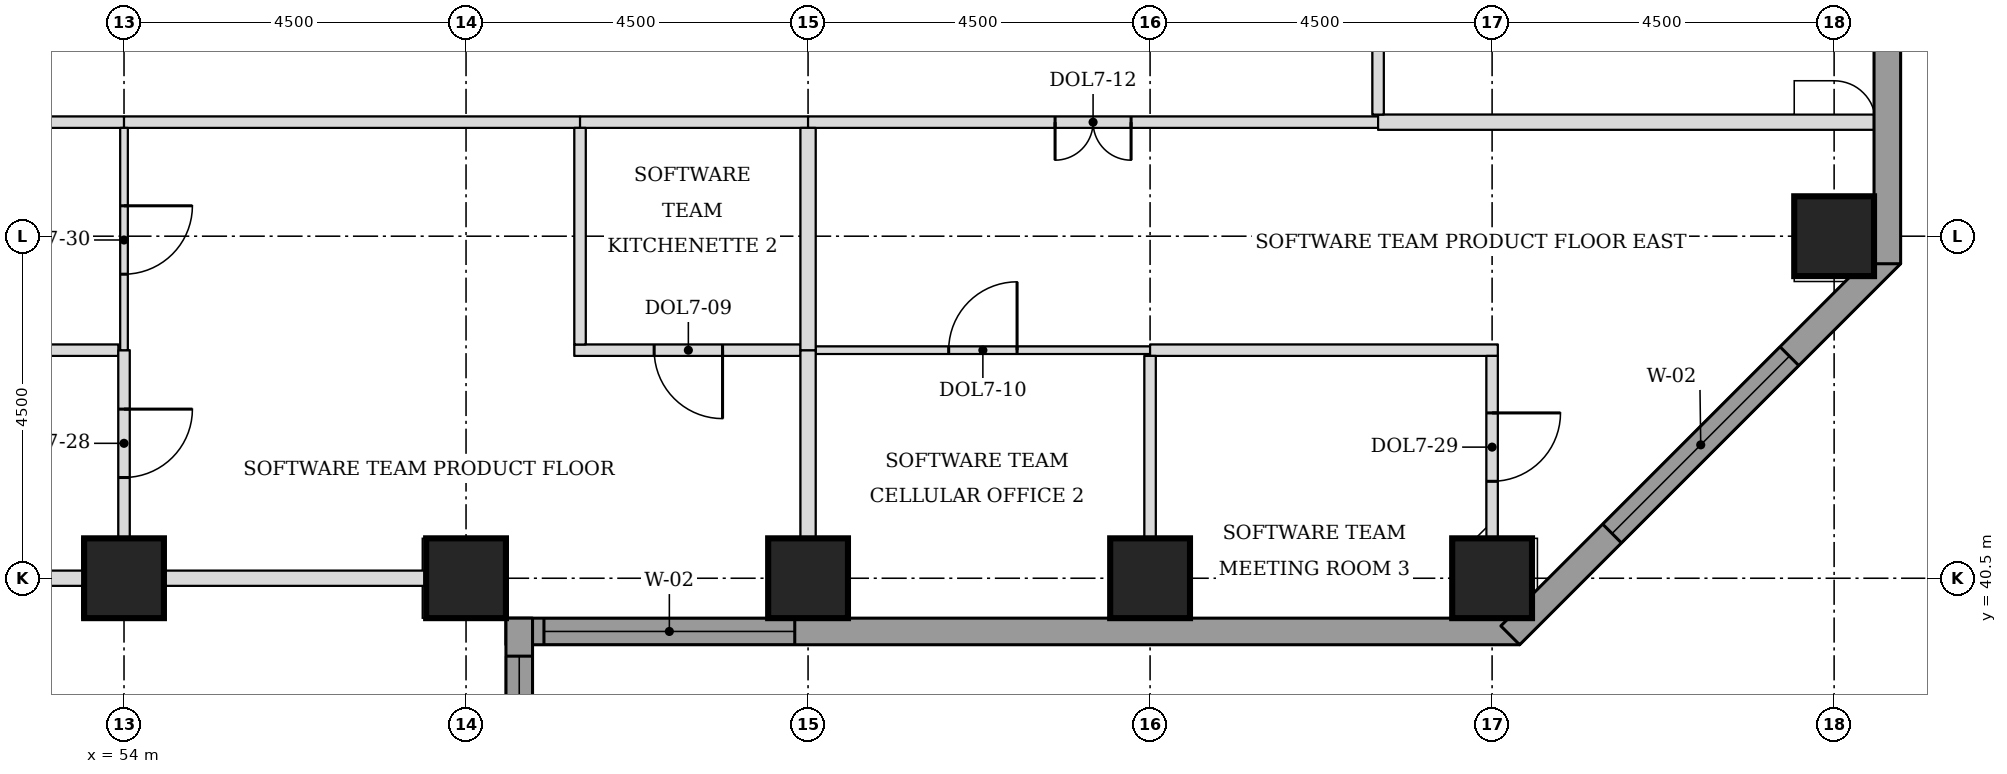
"""IFC4 building model, lengths in metres.
Left out: names, types, materials, properties, quantities, classifications, styles, units other than length and angle.
Written with IfcOpenShell. Run it as: python <this file> out.ifc"""

import sys

from ifc_helpers import new_model, si_unit, direction, frame, frame_2d, origin, origin_2d, place, context, subcontext, project, spatial, rectangle, extrude, element, fill, save


model = new_model("IFC4")
c1 = context("Model", 3, precision=1e-05, world=origin(), true_north=direction((0.0, 1.0)))
c2 = subcontext(c1, "Body", "Model", "MODEL_VIEW")
j1 = project(units=[si_unit("LENGTHUNIT", "METRE"), si_unit("PLANEANGLEUNIT", "RADIAN")], contexts=[c1])
p1 = place(None, origin())
s1 = spatial("IfcSite", under=j1, at=p1, CompositionType="ELEMENT")
p2 = place(p1, origin())
s2 = spatial("IfcBuilding", under=s1, at=p2, CompositionType="ELEMENT")
p3 = place(p2, frame((0.0, 0.0, 130.7)))
s3 = spatial("IfcBuildingStorey", under=s2, at=p3, CompositionType="ELEMENT", Elevation=130.7)
for number, where, z_axis, x_axis in (
    (1, (54.0, 40.5, 0.0), (0.0, 0.0, 1.0), (1.0, 0.0, 0.0)),
    (2, (58.5, 40.5, 0.0), (0.0, 0.0, 1.0), (1.0, 0.0, 0.0)),
    (3, (63.0, 40.5, 0.0), (0.0, 0.0, 1.0), (1.0, 0.0, 0.0)),
    (4, (67.5, 40.5, 0.0), (0.0, 0.0, 1.0), (1.0, 0.0, 0.0)),
    (5, (72.0, 40.5, 0.0), (0.0, 0.0, 1.0), (1.0, 0.0, 0.0)),
    (6, (76.5, 45.0, 0.0), (0.0, 0.0, 1.0), (1.0, 0.0, 0.0)),
):
    element("IfcColumn", number, at=place(p3, frame(where, z_axis=z_axis, x_axis=x_axis)), inside=s3, PredefinedType="COLUMN", context=c2, shape_type="SweptSolid", body=[
        extrude(rectangle(XDim=1.05, YDim=1.05, at=origin_2d()), origin(), (0.0, 0.0, 1.0), 3.7),
    ])
p4 = place(p3, frame((59.025, 39.8, 0.0), z_axis=(0.0, 0.0, 1.0), x_axis=(1.0, 0.0, 0.0)))
e7 = element("IfcWall", 7, at=p4, inside=s3, PredefinedType="STANDARD", context=c2, shape_type="SweptSolid", body=[
    extrude(rectangle(XDim=13.337, YDim=0.35, at=frame_2d((6.669, 0.0))), origin(), (0.0, 0.0, 1.0), 3.525),
])
p5 = place(p4, frame((0.5, 0.0, 0.9)))
e8 = element("IfcOpeningElement", 8, at=p5, cuts=e7, PredefinedType="OPENING", context=c2, shape_type="SweptSolid", body=[
    extrude(rectangle(XDim=3.3, YDim=1.9, at=frame_2d((1.65, 0.95))), frame((0.0, 0.185, 0.0), z_axis=(0.0, -1.0, 0.0), x_axis=(1.0, 0.0, 0.0)), (0.0, 0.0, 1.0), 0.37),
])
p6 = place(p3, frame((72.239, 39.749, 0.0), z_axis=(0.0, 0.0, 1.0), x_axis=(0.707106781187, 0.707106781187, 0.0)))
e9 = element("IfcWall", 9, at=p6, inside=s3, PredefinedType="STANDARD", context=c2, shape_type="SweptSolid", body=[
    extrude(rectangle(XDim=7.089, YDim=0.35, at=frame_2d((3.544, 0.0))), origin(), (0.0, 0.0, 1.0), 3.525),
])
p7 = place(p6, frame((1.894, 0.0, 0.9)))
e10 = element("IfcOpeningElement", 10, at=p7, cuts=e9, PredefinedType="OPENING", context=c2, shape_type="SweptSolid", body=[
    extrude(rectangle(XDim=3.3, YDim=1.9, at=frame_2d((1.65, 0.95))), frame((0.0, 0.185, 0.0), z_axis=(0.0, -1.0, 0.0), x_axis=(1.0, 0.0, 0.0)), (0.0, 0.0, 1.0), 0.37),
])
p8 = place(p3, frame((77.2, 44.638, 0.0), z_axis=(0.0, 0.0, 1.0), x_axis=(0.0, 1.0, 0.0)))
e11 = element("IfcWall", 11, at=p8, inside=s3, PredefinedType="STANDARD", context=c2, shape_type="SweptSolid", body=[
    extrude(rectangle(XDim=32.225, YDim=0.35, at=frame_2d((16.112, 0.0))), origin(), (0.0, 0.0, 1.0), 3.525),
])
p9 = place(p8, frame((5.462, 0.0, 0.9)))
e12 = element("IfcOpeningElement", 12, at=p9, cuts=e11, PredefinedType="OPENING", context=c2, shape_type="SweptSolid", body=[
    extrude(rectangle(XDim=3.3, YDim=1.9, at=frame_2d((1.65, 0.95))), frame((0.0, 0.185, 0.0), z_axis=(0.0, -1.0, 0.0), x_axis=(1.0, 0.0, 0.0)), (0.0, 0.0, 1.0), 0.37),
])
p10 = place(p8, frame((9.962, 0.0, 0.9)))
e13 = element("IfcOpeningElement", 13, at=p10, cuts=e11, PredefinedType="OPENING", context=c2, shape_type="SweptSolid", body=[
    extrude(rectangle(XDim=3.3, YDim=1.9, at=frame_2d((1.65, 0.95))), frame((0.0, 0.185, 0.0), z_axis=(0.0, -1.0, 0.0), x_axis=(1.0, 0.0, 0.0)), (0.0, 0.0, 1.0), 0.37),
])
p11 = place(p8, frame((14.462, 0.0, 0.9)))
e14 = element("IfcOpeningElement", 14, at=p11, cuts=e11, PredefinedType="OPENING", context=c2, shape_type="SweptSolid", body=[
    extrude(rectangle(XDim=3.3, YDim=1.9, at=frame_2d((1.65, 0.95))), frame((0.0, 0.185, 0.0), z_axis=(0.0, -1.0, 0.0), x_axis=(1.0, 0.0, 0.0)), (0.0, 0.0, 1.0), 0.37),
])
p12 = place(p8, frame((18.962, 0.0, 0.9)))
e15 = element("IfcOpeningElement", 15, at=p12, cuts=e11, PredefinedType="OPENING", context=c2, shape_type="SweptSolid", body=[
    extrude(rectangle(XDim=3.3, YDim=1.9, at=frame_2d((1.65, 0.95))), frame((0.0, 0.185, 0.0), z_axis=(0.0, -1.0, 0.0), x_axis=(1.0, 0.0, 0.0)), (0.0, 0.0, 1.0), 0.37),
])
p13 = place(p8, frame((23.462, 0.0, 0.9)))
e16 = element("IfcOpeningElement", 16, at=p13, cuts=e11, PredefinedType="OPENING", context=c2, shape_type="SweptSolid", body=[
    extrude(rectangle(XDim=3.3, YDim=1.9, at=frame_2d((1.65, 0.95))), frame((0.0, 0.185, 0.0), z_axis=(0.0, -1.0, 0.0), x_axis=(1.0, 0.0, 0.0)), (0.0, 0.0, 1.0), 0.37),
])
p14 = place(p3, frame((59.2, 22.138, 0.0), z_axis=(0.0, 0.0, 1.0), x_axis=(0.0, 1.0, 0.0)))
e17 = element("IfcWall", 17, at=p14, inside=s3, PredefinedType="STANDARD", context=c2, shape_type="SweptSolid", body=[
    extrude(rectangle(XDim=17.837, YDim=0.35, at=frame_2d((8.919, 0.0))), origin(), (0.0, 0.0, 1.0), 3.525),
])
p15 = place(p14, frame((5.462, 0.0, 0.9)))
e18 = element("IfcOpeningElement", 18, at=p15, cuts=e17, PredefinedType="OPENING", context=c2, shape_type="SweptSolid", body=[
    extrude(rectangle(XDim=3.3, YDim=1.9, at=frame_2d((1.65, 0.95))), frame((0.0, 0.185, 0.0), z_axis=(0.0, -1.0, 0.0), x_axis=(1.0, 0.0, 0.0)), (0.0, 0.0, 1.0), 0.37),
])
p16 = place(p14, frame((14.037, 0.0, 0.9)))
e19 = element("IfcOpeningElement", 19, at=p16, cuts=e17, PredefinedType="OPENING", context=c2, shape_type="SweptSolid", body=[
    extrude(rectangle(XDim=3.3, YDim=1.9, at=frame_2d((1.65, 0.95))), frame((0.0, 0.185, 0.0), z_axis=(0.0, -1.0, 0.0), x_axis=(1.0, 0.0, 0.0)), (0.0, 0.0, 1.0), 0.37),
])
p17 = place(p3, frame((50.015, 40.5, 0.0), z_axis=(0.0, 0.0, 1.0), x_axis=(1.0, 0.0, 0.0)))
e20 = element("IfcWall", 20, at=p17, inside=s3, PredefinedType="PARTITIONING", context=c2, shape_type="SweptSolid", body=[
    extrude(rectangle(XDim=3.46, YDim=0.2, at=frame_2d((1.73, 0.0))), origin(), (0.0, 0.0, 1.0), 2.8),
])
p18 = place(p3, frame((54.495, 40.5, 0.0), z_axis=(0.0, 0.0, 1.0), x_axis=(1.0, 0.0, 0.0)))
e21 = element("IfcWall", 21, at=p18, inside=s3, PredefinedType="PARTITIONING", context=c2, shape_type="SweptSolid", body=[
    extrude(rectangle(XDim=3.48, YDim=0.2, at=frame_2d((1.74, 0.0))), origin(), (0.0, 0.0, 1.0), 2.8),
])
p19 = place(p3, frame((49.575, 43.5, 0.0), z_axis=(0.0, 0.0, 1.0), x_axis=(1.0, 0.0, 0.0)))
e22 = element("IfcWall", 22, at=p19, inside=s3, PredefinedType="PARTITIONING", context=c2, shape_type="SweptSolid", body=[
    extrude(rectangle(XDim=4.35, YDim=0.15, at=frame_2d((2.175, 0.0))), origin(), (0.0, 0.0, 1.0), 3.55),
])
p20 = place(p3, frame((59.925, 43.5, 0.0), z_axis=(0.0, 0.0, 1.0), x_axis=(1.0, 0.0, 0.0)))
e23 = element("IfcWall", 23, at=p20, inside=s3, PredefinedType="PARTITIONING", context=c2, shape_type="SweptSolid", body=[
    extrude(rectangle(XDim=2.975, YDim=0.15, at=frame_2d((1.487, 0.0))), origin(), (0.0, 0.0, 1.0), 3.55),
])
p21 = place(p20, frame((1.05, 0.0, 0.0)))
e24 = element("IfcOpeningElement", 24, at=p21, cuts=e23, PredefinedType="OPENING", context=c2, shape_type="SweptSolid", body=[
    extrude(rectangle(XDim=0.9, YDim=2.1, at=frame_2d((0.45, 1.05))), frame((0.0, 0.085, 0.0), z_axis=(0.0, -1.0, 0.0), x_axis=(1.0, 0.0, 0.0)), (0.0, 0.0, 1.0), 0.17),
])
p22 = place(p3, frame((63.1, 43.5, 0.0), z_axis=(0.0, 0.0, 1.0), x_axis=(1.0, 0.0, 0.0)))
e25 = element("IfcWall", 25, at=p22, inside=s3, PredefinedType="PARTITIONING", context=c2, shape_type="SweptSolid", body=[
    extrude(rectangle(XDim=4.4, YDim=0.1, at=frame_2d((2.2, 0.0))), origin(), (0.0, 0.0, 1.0), 3.55),
])
p23 = place(p22, frame((1.75, 0.0, 0.0)))
e26 = element("IfcOpeningElement", 26, at=p23, cuts=e25, PredefinedType="OPENING", context=c2, shape_type="SweptSolid", body=[
    extrude(rectangle(XDim=0.9, YDim=2.1, at=frame_2d((0.45, 1.05))), frame((0.0, 0.06, 0.0), z_axis=(0.0, -1.0, 0.0), x_axis=(1.0, 0.0, 0.0)), (0.0, 0.0, 1.0), 0.12),
])
p24 = place(p3, frame((67.5, 43.5, 0.0), z_axis=(0.0, 0.0, 1.0), x_axis=(1.0, 0.0, 0.0)))
e27 = element("IfcWall", 27, at=p24, inside=s3, PredefinedType="PARTITIONING", context=c2, shape_type="SweptSolid", body=[
    extrude(rectangle(XDim=4.575, YDim=0.15, at=frame_2d((2.288, 0.0))), origin(), (0.0, 0.0, 1.0), 3.55),
])
p25 = place(p3, frame((49.425, 46.5, 0.0), z_axis=(0.0, 0.0, 1.0), x_axis=(1.0, 0.0, 0.0)))
e28 = element("IfcWall", 28, at=p25, inside=s3, PredefinedType="PARTITIONING", context=c2, shape_type="SweptSolid", body=[
    extrude(rectangle(XDim=4.575, YDim=0.15, at=frame_2d((2.288, 0.0))), origin(), (0.0, 0.0, 1.0), 3.55),
])
p26 = place(p25, frame((1.8, 0.0, 0.0)))
e29 = element("IfcOpeningElement", 29, at=p26, cuts=e28, PredefinedType="OPENING", context=c2, shape_type="SweptSolid", body=[
    extrude(rectangle(XDim=1.0, YDim=2.1, at=frame_2d((0.5, 1.05))), frame((0.0, 0.085, 0.0), z_axis=(0.0, -1.0, 0.0), x_axis=(1.0, 0.0, 0.0)), (0.0, 0.0, 1.0), 0.17),
])
p27 = place(p3, frame((54.0, 46.5, 0.0), z_axis=(0.0, 0.0, 1.0), x_axis=(1.0, 0.0, 0.0)))
e30 = element("IfcWall", 30, at=p27, inside=s3, PredefinedType="PARTITIONING", context=c2, shape_type="SweptSolid", body=[
    extrude(rectangle(XDim=6.0, YDim=0.15, at=frame_2d((3.0, 0.0))), origin(), (0.0, 0.0, 1.0), 3.55),
])
p28 = place(p3, frame((60.0, 46.5, 0.0), z_axis=(0.0, 0.0, 1.0), x_axis=(1.0, 0.0, 0.0)))
e31 = element("IfcWall", 31, at=p28, inside=s3, PredefinedType="PARTITIONING", context=c2, shape_type="SweptSolid", body=[
    extrude(rectangle(XDim=3.0, YDim=0.15, at=frame_2d((1.5, 0.0))), origin(), (0.0, 0.0, 1.0), 3.55),
])
p29 = place(p3, frame((63.0, 46.5, 0.0), z_axis=(0.0, 0.0, 1.0), x_axis=(1.0, 0.0, 0.0)))
e32 = element("IfcWall", 32, at=p29, inside=s3, PredefinedType="PARTITIONING", context=c2, shape_type="SweptSolid", body=[
    extrude(rectangle(XDim=7.5, YDim=0.15, at=frame_2d((3.75, 0.0))), origin(), (0.0, 0.0, 1.0), 3.55),
])
p30 = place(p29, frame((3.25, 0.0, 0.0)))
e33 = element("IfcOpeningElement", 33, at=p30, cuts=e32, PredefinedType="OPENING", context=c2, shape_type="SweptSolid", body=[
    extrude(rectangle(XDim=1.0, YDim=2.1, at=frame_2d((0.5, 1.05))), frame((0.0, 0.085, 0.0), z_axis=(0.0, -1.0, 0.0), x_axis=(1.0, 0.0, 0.0)), (0.0, 0.0, 1.0), 0.17),
])
p31 = place(p3, frame((70.5, 46.5, 0.0), z_axis=(0.0, 0.0, 1.0), x_axis=(1.0, 0.0, 0.0)))
e34 = element("IfcWall", 34, at=p31, inside=s3, PredefinedType="PARTITIONING", context=c2, shape_type="SweptSolid", body=[
    extrude(rectangle(XDim=6.525, YDim=0.2, at=frame_2d((3.262, 0.0))), origin(), (0.0, 0.0, 1.0), 3.55),
])
p32 = place(p3, frame((63.0, 39.975, 0.0), z_axis=(0.0, 0.0, 1.0), x_axis=(0.0, 1.0, 0.0)))
e35 = element("IfcWall", 35, at=p32, inside=s3, PredefinedType="PARTITIONING", context=c2, shape_type="SweptSolid", body=[
    extrude(rectangle(XDim=3.525, YDim=0.2, at=frame_2d((1.762, 0.0))), origin(), (0.0, 0.0, 1.0), 3.55),
])
p33 = place(p3, frame((67.5, 39.975, 0.0), z_axis=(0.0, 0.0, 1.0), x_axis=(0.0, 1.0, 0.0)))
e36 = element("IfcWall", 36, at=p33, inside=s3, PredefinedType="PARTITIONING", context=c2, shape_type="SweptSolid", body=[
    extrude(rectangle(XDim=3.45, YDim=0.15, at=frame_2d((1.725, 0.0))), origin(), (0.0, 0.0, 1.0), 3.55),
])
p34 = place(p3, frame((54.0, 41.025, 0.0), z_axis=(0.0, 0.0, 1.0), x_axis=(0.0, 1.0, 0.0)))
e37 = element("IfcWall", 37, at=p34, inside=s3, PredefinedType="PARTITIONING", context=c2, shape_type="SweptSolid", body=[
    extrude(rectangle(XDim=2.475, YDim=0.15, at=frame_2d((1.238, 0.0))), origin(), (0.0, 0.0, 1.0), 3.55),
])
p35 = place(p34, frame((0.8, 0.0, 0.0)))
e38 = element("IfcOpeningElement", 38, at=p35, cuts=e37, PredefinedType="OPENING", context=c2, shape_type="SweptSolid", body=[
    extrude(rectangle(XDim=0.9, YDim=2.1, at=frame_2d((0.45, 1.05))), frame((0.0, 0.085, 0.0), z_axis=(0.0, -1.0, 0.0), x_axis=(1.0, 0.0, 0.0)), (0.0, 0.0, 1.0), 0.17),
])
p36 = place(p3, frame((72.0, 41.025, 0.0), z_axis=(0.0, 0.0, 1.0), x_axis=(0.0, 1.0, 0.0)))
e39 = element("IfcWall", 39, at=p36, inside=s3, PredefinedType="PARTITIONING", context=c2, shape_type="SweptSolid", body=[
    extrude(rectangle(XDim=2.4, YDim=0.15, at=frame_2d((1.2, 0.0))), origin(), (0.0, 0.0, 1.0), 3.55),
])
p37 = place(p36, frame((0.75, 0.0, 0.0)))
e40 = element("IfcOpeningElement", 40, at=p37, cuts=e39, PredefinedType="OPENING", context=c2, shape_type="SweptSolid", body=[
    extrude(rectangle(XDim=0.9, YDim=2.1, at=frame_2d((0.45, 1.05))), frame((0.0, 0.085, 0.0), z_axis=(0.0, -1.0, 0.0), x_axis=(1.0, 0.0, 0.0)), (0.0, 0.0, 1.0), 0.17),
])
p38 = place(p3, frame((54.0, 43.5, 0.0), z_axis=(0.0, 0.0, 1.0), x_axis=(0.0, 1.0, 0.0)))
e41 = element("IfcWall", 41, at=p38, inside=s3, PredefinedType="PARTITIONING", context=c2, shape_type="SweptSolid", body=[
    extrude(rectangle(XDim=2.925, YDim=0.1, at=frame_2d((1.462, 0.0))), origin(), (0.0, 0.0, 1.0), 3.55),
])
p39 = place(p38, frame((1.0, 0.0, 0.0)))
e42 = element("IfcOpeningElement", 42, at=p39, cuts=e41, PredefinedType="OPENING", context=c2, shape_type="SweptSolid", body=[
    extrude(rectangle(XDim=0.9, YDim=2.1, at=frame_2d((0.45, 1.05))), frame((0.0, 0.06, 0.0), z_axis=(0.0, -1.0, 0.0), x_axis=(1.0, 0.0, 0.0)), (0.0, 0.0, 1.0), 0.12),
])
p40 = place(p3, frame((63.0, 43.5, 0.0), z_axis=(0.0, 0.0, 1.0), x_axis=(0.0, 1.0, 0.0)))
e43 = element("IfcWall", 43, at=p40, inside=s3, PredefinedType="PARTITIONING", context=c2, shape_type="SweptSolid", body=[
    extrude(rectangle(XDim=2.925, YDim=0.2, at=frame_2d((1.462, 0.0))), origin(), (0.0, 0.0, 1.0), 3.55),
])
p41 = place(p3, frame((60.0, 43.575, 0.0), z_axis=(0.0, 0.0, 1.0), x_axis=(0.0, 1.0, 0.0)))
e44 = element("IfcWall", 44, at=p41, inside=s3, PredefinedType="PARTITIONING", context=c2, shape_type="SweptSolid", body=[
    extrude(rectangle(XDim=2.85, YDim=0.15, at=frame_2d((1.425, 0.0))), origin(), (0.0, 0.0, 1.0), 3.55),
])
p42 = place(p3, frame((70.5, 46.6, 0.0), z_axis=(0.0, 0.0, 1.0), x_axis=(0.0, 1.0, 0.0)))
e45 = element("IfcWall", 45, at=p42, inside=s3, PredefinedType="PARTITIONING", context=c2, shape_type="SweptSolid", body=[
    extrude(rectangle(XDim=13.4, YDim=0.15, at=frame_2d((6.7, 0.0))), origin(), (0.0, 0.0, 1.0), 3.55),
])
p43 = place(p42, frame((6.2, 0.0, 0.0)))
e46 = element("IfcOpeningElement", 46, at=p43, cuts=e45, PredefinedType="OPENING", context=c2, shape_type="SweptSolid", body=[
    extrude(rectangle(XDim=1.0, YDim=2.1, at=frame_2d((0.5, 1.05))), frame((0.0, 0.085, 0.0), z_axis=(0.0, -1.0, 0.0), x_axis=(1.0, 0.0, 0.0)), (0.0, 0.0, 1.0), 0.17),
])
p44 = place(p5, origin())
e47 = element("IfcWindow", 47, at=p44, inside=s3, PartitioningType="SINGLE_PANEL", PredefinedType="WINDOW", context=c2, shape_type="SweptSolid", body=[
    extrude(rectangle(XDim=3.3, YDim=1.9, at=frame_2d((1.65, 0.95))), frame((0.0, 0.085, 0.0), z_axis=(0.0, -1.0, 0.0), x_axis=(1.0, 0.0, 0.0)), (0.0, 0.0, 1.0), 0.06),
])
fill(e8, e47)
p45 = place(p7, origin())
e48 = element("IfcWindow", 48, at=p45, inside=s3, PartitioningType="SINGLE_PANEL", PredefinedType="WINDOW", context=c2, shape_type="SweptSolid", body=[
    extrude(rectangle(XDim=3.3, YDim=1.9, at=frame_2d((1.65, 0.95))), frame((0.0, 0.085, 0.0), z_axis=(0.0, -1.0, 0.0), x_axis=(1.0, 0.0, 0.0)), (0.0, 0.0, 1.0), 0.06),
])
fill(e10, e48)
p46 = place(p16, origin())
e49 = element("IfcWindow", 49, at=p46, inside=s3, PartitioningType="SINGLE_PANEL", PredefinedType="WINDOW", context=c2, shape_type="SweptSolid", body=[
    extrude(rectangle(XDim=3.3, YDim=1.9, at=frame_2d((1.65, 0.95))), frame((0.0, 0.085, 0.0), z_axis=(0.0, -1.0, 0.0), x_axis=(1.0, 0.0, 0.0)), (0.0, 0.0, 1.0), 0.06),
])
fill(e19, e49)
p47 = place(p39, frame((0.9, 0.0, 0.0), z_axis=(0.0, 0.0, 1.0), x_axis=(-1.0, 0.0, 0.0)))
e50 = element("IfcDoor", 50, at=p47, inside=s3, OperationType="SINGLE_SWING_LEFT", PredefinedType="DOOR", context=c2, shape_type="SweptSolid", body=[
    extrude(rectangle(XDim=0.9, YDim=2.1, at=frame_2d((0.45, 1.05))), frame((0.0, 0.025, 0.0), z_axis=(0.0, -1.0, 0.0), x_axis=(1.0, 0.0, 0.0)), (0.0, 0.0, 1.0), 0.05),
])
fill(e42, e50)
p48 = place(p21, frame((0.9, 0.0, 0.0), z_axis=(0.0, 0.0, 1.0), x_axis=(-1.0, 0.0, 0.0)))
e51 = element("IfcDoor", 51, at=p48, inside=s3, OperationType="SINGLE_SWING_LEFT", PredefinedType="DOOR", context=c2, shape_type="SweptSolid", body=[
    extrude(rectangle(XDim=0.9, YDim=2.1, at=frame_2d((0.45, 1.05))), frame((0.0, 0.025, 0.0), z_axis=(0.0, -1.0, 0.0), x_axis=(1.0, 0.0, 0.0)), (0.0, 0.0, 1.0), 0.05),
])
fill(e24, e51)
p49 = place(p35, frame((0.9, 0.0, 0.0), z_axis=(0.0, 0.0, 1.0), x_axis=(-1.0, 0.0, 0.0)))
e52 = element("IfcDoor", 52, at=p49, inside=s3, OperationType="SINGLE_SWING_LEFT", PredefinedType="DOOR", context=c2, shape_type="SweptSolid", body=[
    extrude(rectangle(XDim=0.9, YDim=2.1, at=frame_2d((0.45, 1.05))), frame((0.0, 0.025, 0.0), z_axis=(0.0, -1.0, 0.0), x_axis=(1.0, 0.0, 0.0)), (0.0, 0.0, 1.0), 0.05),
])
fill(e38, e52)
p50 = place(p30, frame((1.0, 0.0, 0.0), z_axis=(0.0, 0.0, 1.0), x_axis=(-1.0, 0.0, 0.0)))
e53 = element("IfcDoor", 53, at=p50, inside=s3, OperationType="DOUBLE_DOOR_SINGLE_SWING", PredefinedType="DOOR", context=c2, shape_type="SweptSolid", body=[
    extrude(rectangle(XDim=1.0, YDim=2.1, at=frame_2d((0.5, 1.05))), frame((0.0, 0.025, 0.0), z_axis=(0.0, -1.0, 0.0), x_axis=(1.0, 0.0, 0.0)), (0.0, 0.0, 1.0), 0.05),
])
fill(e33, e53)
p51 = place(p23, origin())
e54 = element("IfcDoor", 54, at=p51, inside=s3, OperationType="SINGLE_SWING_RIGHT", PredefinedType="DOOR", context=c2, shape_type="SweptSolid", body=[
    extrude(rectangle(XDim=0.9, YDim=2.1, at=frame_2d((0.45, 1.05))), frame((0.0, 0.025, 0.0), z_axis=(0.0, -1.0, 0.0), x_axis=(1.0, 0.0, 0.0)), (0.0, 0.0, 1.0), 0.05),
])
fill(e26, e54)
p52 = place(p37, frame((0.9, 0.0, 0.0), z_axis=(0.0, 0.0, 1.0), x_axis=(-1.0, 0.0, 0.0)))
e55 = element("IfcDoor", 55, at=p52, inside=s3, OperationType="SINGLE_SWING_LEFT", PredefinedType="DOOR", context=c2, shape_type="SweptSolid", body=[
    extrude(rectangle(XDim=0.9, YDim=2.1, at=frame_2d((0.45, 1.05))), frame((0.0, 0.025, 0.0), z_axis=(0.0, -1.0, 0.0), x_axis=(1.0, 0.0, 0.0)), (0.0, 0.0, 1.0), 0.05),
])
fill(e40, e55)
save(model, sys.argv[1])
